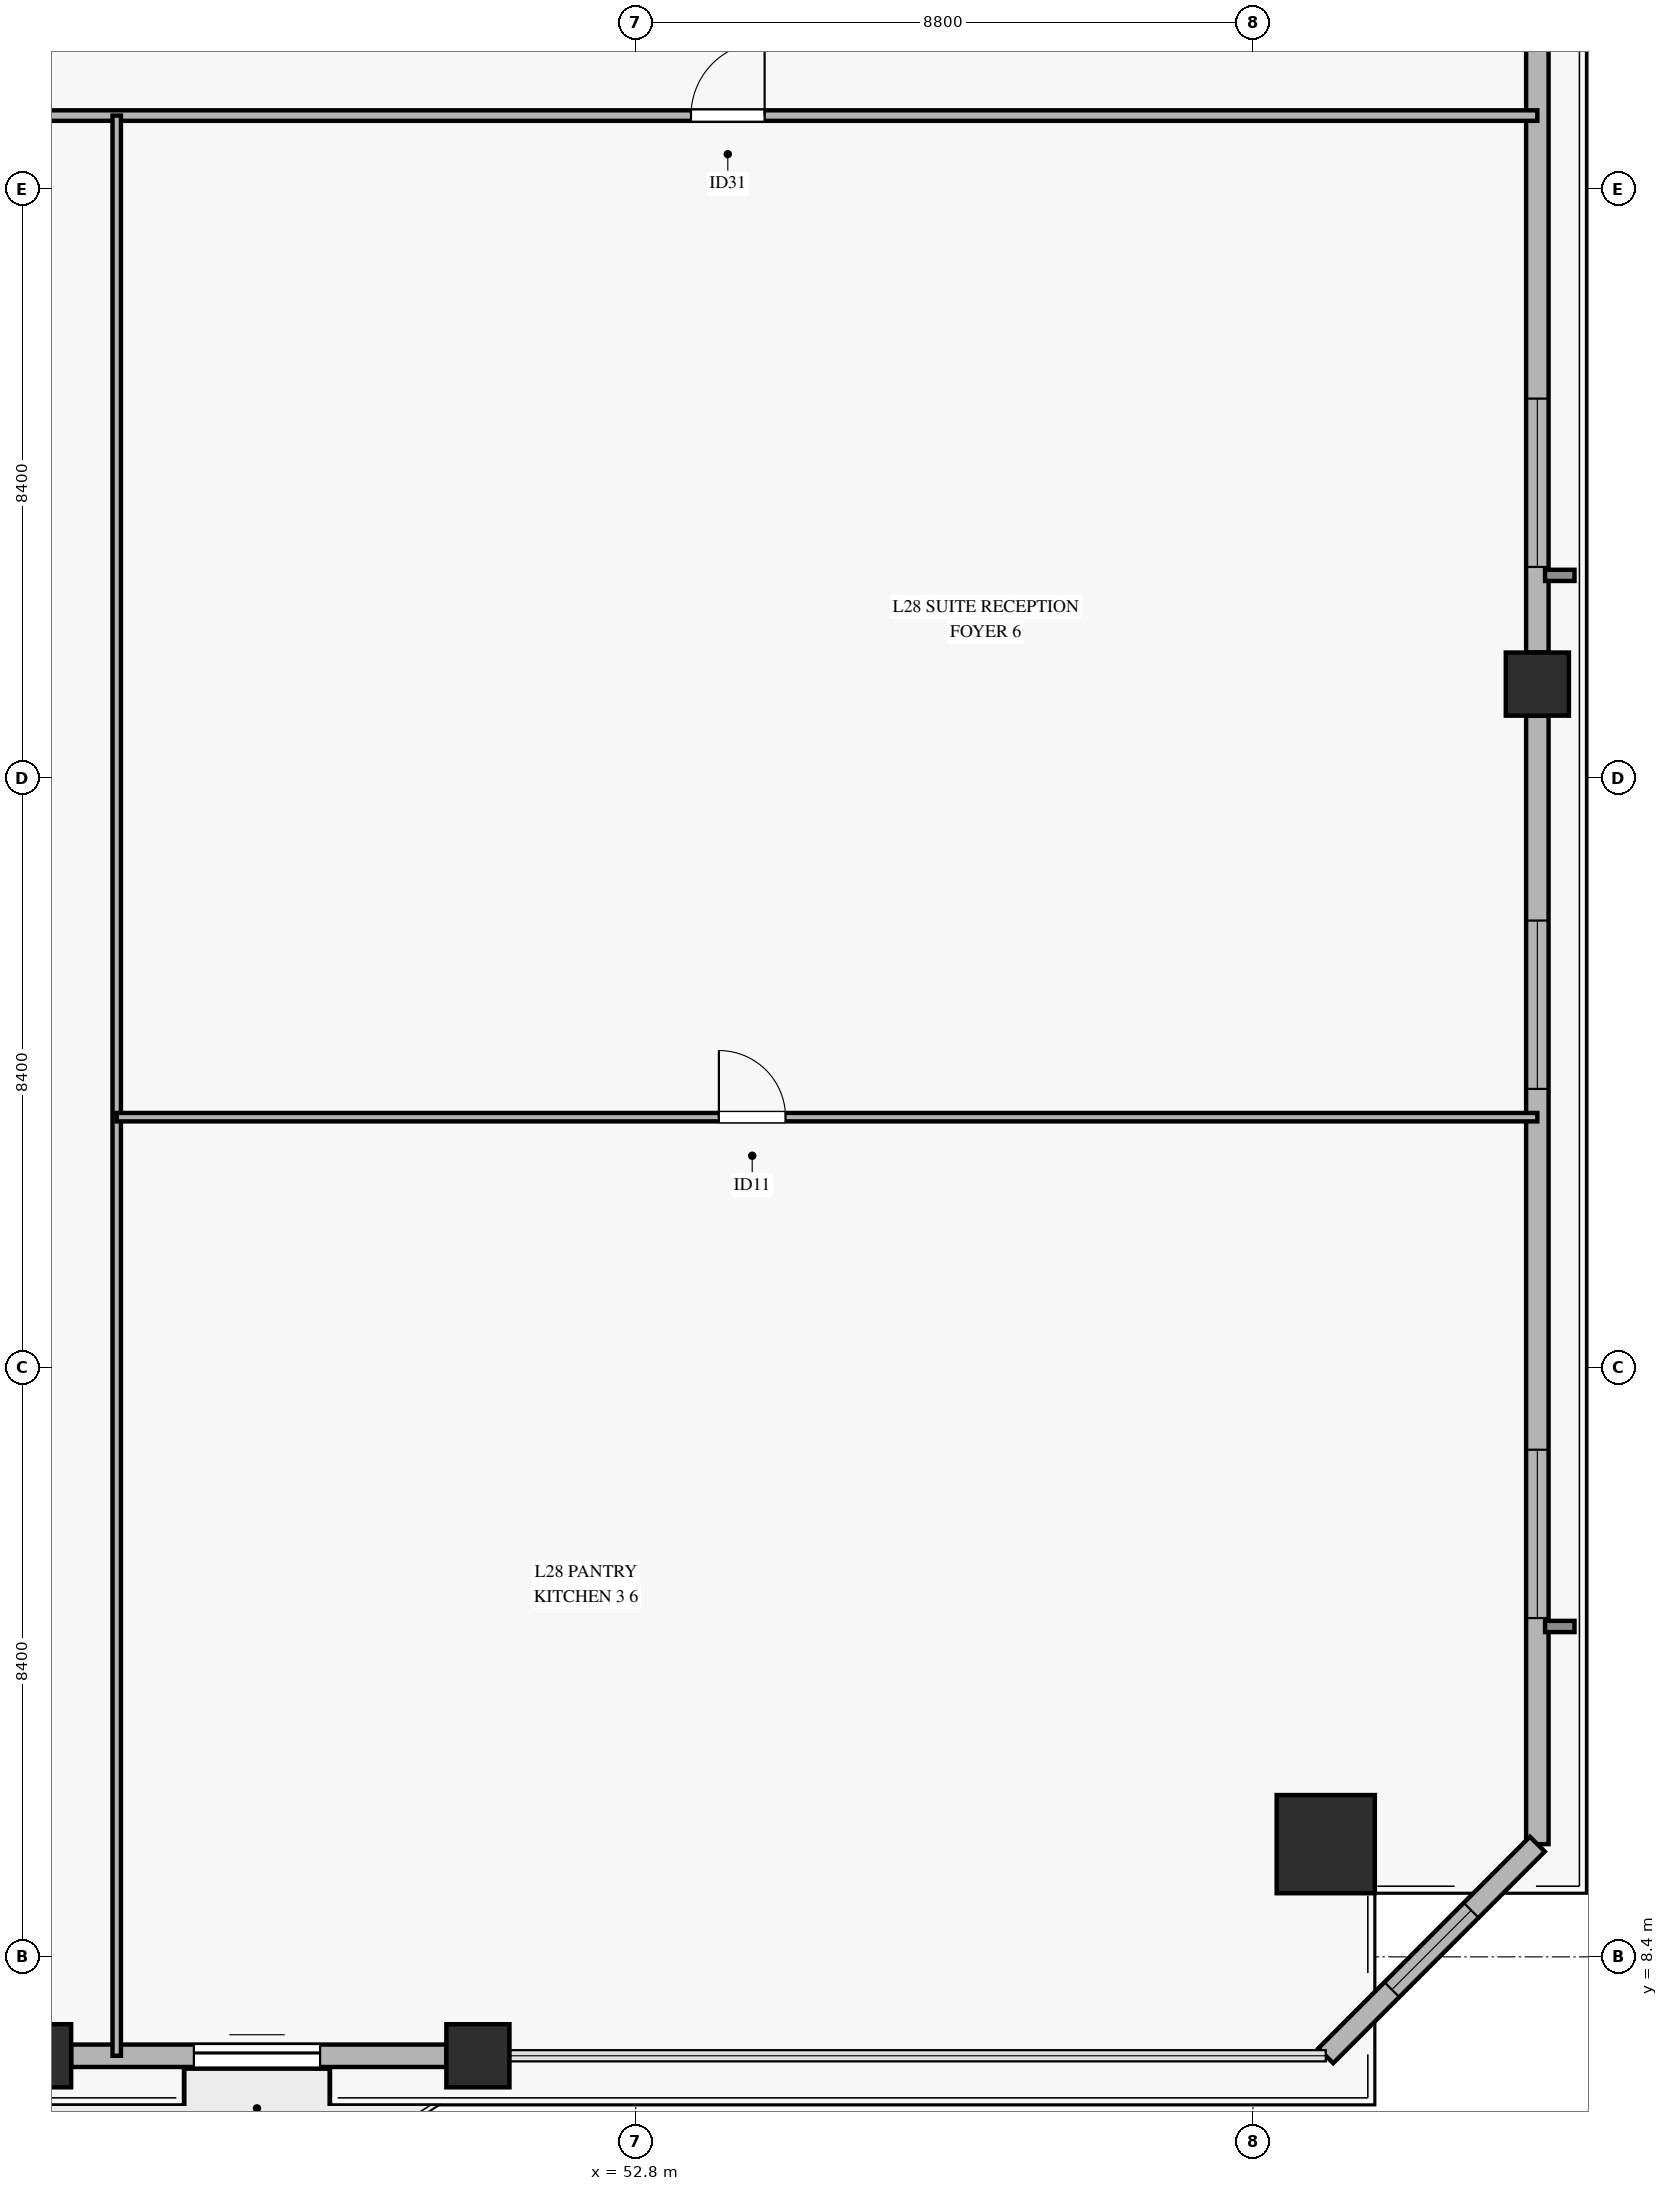
"""IFC4 building model, lengths in metres.
Left out: names, types, materials, properties, quantities, classifications, styles, units other than length and angle.
Written with IfcOpenShell. Run it as: python <this file> out.ifc"""

import sys

from ifc_helpers import new_model, si_unit, direction, frame, frame_2d, origin, origin_2d, place, context, subcontext, project, spatial, rectangle, hollow_rectangle, extrude, source, transform, mapped, element, fill, save


model = new_model("IFC4")
c1 = context("Model", 3, precision=1e-05, world=origin(), true_north=direction((0.0, 1.0)))
c2 = subcontext(c1, "Body", "Model", "MODEL_VIEW")
j1 = project(units=[si_unit("LENGTHUNIT", "METRE"), si_unit("PLANEANGLEUNIT", "RADIAN")], contexts=[c1])
p1 = place(None, origin())
s1 = spatial("IfcSite", under=j1, at=p1, CompositionType="ELEMENT")
p2 = place(p1, origin())
s2 = spatial("IfcBuilding", under=s1, at=p2, CompositionType="ELEMENT")
p3 = place(p2, frame((0.0, 0.0, 115.3)))
s3 = spatial("IfcBuildingStorey", under=s2, at=p3, CompositionType="ELEMENT", Elevation=115.3)
m1 = source(origin(), c2, "Body", "SweptSolid", [
    extrude(hollow_rectangle(XDim=1.4, YDim=1.4, WallThickness=0.065, at=origin_2d()), origin(), (0.0, 0.0, 1.0), 3.68),
])
p4 = place(p3, frame((62.639, 10.007, 0.0), z_axis=(0.0, 0.0, 1.0), x_axis=(1.0, 0.0, 0.0)))
e1 = element("IfcColumn", 1, at=p4, inside=s3, PredefinedType="COLUMN", context=c2, shape_type="MappedRepresentation", body=[
    mapped(m1, transform((0.0, 0.0, 0.0), x_axis=(1.0, 0.0, 0.0), y_axis=(0.0, 1.0, 0.0), z_axis=(0.0, 0.0, 1.0), scale=1.0)),
])
m2 = source(origin(), c2, "Body", "SweptSolid", [
    extrude(hollow_rectangle(XDim=0.9, YDim=0.9, WallThickness=0.04, at=origin_2d()), origin(), (0.0, 0.0, 1.0), 3.68),
])
for number, where, z_axis, x_axis in (
    (2, (44.3, 6.99, 0.0), (0.0, 0.0, 1.0), (1.0, 0.0, 0.0)),
    (3, (50.55, 6.99, 0.0), (0.0, 0.0, 1.0), (1.0, 0.0, 0.0)),
    (4, (65.656, 26.545, 0.0), (0.0, 0.0, 1.0), (1.0, 0.0, 0.0)),
):
    element("IfcColumn", number, at=place(p3, frame(where, z_axis=z_axis, x_axis=x_axis)), inside=s3, PredefinedType="COLUMN", context=c2, shape_type="MappedRepresentation", body=[
        mapped(m2, transform((0.0, 0.0, 0.0), x_axis=(1.0, 0.0, 0.0), y_axis=(0.0, 1.0, 0.0), z_axis=(0.0, 0.0, 1.0), scale=1.0)),
    ])
p5 = place(p3, frame((44.75, 6.99, 0.0), z_axis=(0.0, 0.0, 1.0), x_axis=(1.0, 0.0, 0.0)))
e5 = element("IfcWall", 5, at=p5, inside=s3, PredefinedType="SOLIDWALL", context=c2, shape_type="SweptSolid", body=[
    extrude(rectangle(XDim=5.35, YDim=0.32, at=frame_2d((2.675, 0.0))), origin(), (0.0, 0.0, 1.0), 3.16),
])
p6 = place(p5, frame((1.75, 0.0, 0.0)))
e6 = element("IfcOpeningElement", 6, at=p6, cuts=e5, PredefinedType="OPENING", context=c2, shape_type="SweptSolid", body=[
    extrude(rectangle(XDim=1.8, YDim=2.25, at=frame_2d((0.9, 1.125))), frame((0.0, 0.17, 0.0), z_axis=(0.0, -1.0, 0.0), x_axis=(1.0, 0.0, 0.0)), (0.0, 0.0, 1.0), 0.34),
])
p7 = place(p3, frame((65.656, 10.007, 0.0), z_axis=(0.0, 0.0, 1.0), x_axis=(0.0, 1.0, 0.0)))
e7 = element("IfcWall", 7, at=p7, inside=s3, PredefinedType="SOLIDWALL", context=c2, shape_type="SweptSolid", body=[
    extrude(rectangle(XDim=16.088, YDim=0.32, at=frame_2d((8.044, 0.0))), origin(), (0.0, 0.0, 1.0), 3.16),
])
p8 = place(p7, frame((3.223, 0.0, 0.45)))
e8 = element("IfcOpeningElement", 8, at=p8, cuts=e7, PredefinedType="OPENING", context=c2, shape_type="SweptSolid", body=[
    extrude(rectangle(XDim=2.4, YDim=2.1, at=frame_2d((1.2, 1.05))), frame((0.0, 0.17, 0.0), z_axis=(0.0, -1.0, 0.0), x_axis=(1.0, 0.0, 0.0)), (0.0, 0.0, 1.0), 0.34),
])
p9 = place(p7, frame((10.767, 0.0, 0.45)))
e9 = element("IfcOpeningElement", 9, at=p9, cuts=e7, PredefinedType="OPENING", context=c2, shape_type="SweptSolid", body=[
    extrude(rectangle(XDim=2.4, YDim=2.1, at=frame_2d((1.2, 1.05))), frame((0.0, 0.17, 0.0), z_axis=(0.0, -1.0, 0.0), x_axis=(1.0, 0.0, 0.0)), (0.0, 0.0, 1.0), 0.34),
])
p10 = place(p3, frame((65.656, 26.995, 0.0), z_axis=(0.0, 0.0, 1.0), x_axis=(0.0, 1.0, 0.0)))
e10 = element("IfcWall", 10, at=p10, inside=s3, PredefinedType="SOLIDWALL", context=c2, shape_type="SweptSolid", body=[
    extrude(rectangle(XDim=16.088, YDim=0.32, at=frame_2d((8.044, 0.0))), origin(), (0.0, 0.0, 1.0), 3.16),
])
p11 = place(p10, frame((1.22, 0.0, 0.45)))
e11 = element("IfcOpeningElement", 11, at=p11, cuts=e10, PredefinedType="OPENING", context=c2, shape_type="SweptSolid", body=[
    extrude(rectangle(XDim=2.4, YDim=2.1, at=frame_2d((1.2, 1.05))), frame((0.0, 0.17, 0.0), z_axis=(0.0, -1.0, 0.0), x_axis=(1.0, 0.0, 0.0)), (0.0, 0.0, 1.0), 0.34),
])
p12 = place(p10, frame((12.375, 0.0, 0.45)))
e12 = element("IfcOpeningElement", 12, at=p12, cuts=e10, PredefinedType="OPENING", context=c2, shape_type="SweptSolid", body=[
    extrude(rectangle(XDim=2.4, YDim=2.1, at=frame_2d((1.2, 1.05))), frame((0.0, 0.17, 0.0), z_axis=(0.0, -1.0, 0.0), x_axis=(1.0, 0.0, 0.0)), (0.0, 0.0, 1.0), 0.34),
])
p13 = place(p3, frame((62.639, 6.99, 0.0), z_axis=(0.0, 0.0, 1.0), x_axis=(0.707106781187, 0.707106781187, 0.0)))
e13 = element("IfcWall", 13, at=p13, inside=s3, PredefinedType="SOLIDWALL", context=c2, shape_type="SweptSolid", body=[
    extrude(rectangle(XDim=4.267, YDim=0.3, at=frame_2d((2.133, 0.0))), origin(), (0.0, 0.0, 1.0), 3.16),
])
p14 = place(p13, frame((1.333, 0.0, 0.45)))
e14 = element("IfcOpeningElement", 14, at=p14, cuts=e13, PredefinedType="OPENING", context=c2, shape_type="SweptSolid", body=[
    extrude(rectangle(XDim=1.6, YDim=2.0, at=frame_2d((0.8, 1.0))), frame((0.0, 0.16, 0.0), z_axis=(0.0, -1.0, 0.0), x_axis=(1.0, 0.0, 0.0)), (0.0, 0.0, 1.0), 0.32),
])
p15 = place(p3, frame((4.744, 34.65, 0.0), z_axis=(0.0, 0.0, 1.0), x_axis=(1.0, 0.0, 0.0)))
e15 = element("IfcWall", 15, at=p15, inside=s3, PredefinedType="PARTITIONING", context=c2, shape_type="SweptSolid", body=[
    extrude(rectangle(XDim=60.912, YDim=0.15, at=frame_2d((30.456, 0.0))), origin(), (0.0, 0.0, 1.0), 2.765),
])
p16 = place(p15, frame((7.61, 0.0, 0.0)))
e16 = element("IfcOpeningElement", 16, at=p16, cuts=e15, PredefinedType="OPENING", context=c2, shape_type="SweptSolid", body=[
    extrude(rectangle(XDim=1.05, YDim=2.15, at=frame_2d((0.525, 1.075))), frame((0.0, 0.085, 0.0), z_axis=(0.0, -1.0, 0.0), x_axis=(1.0, 0.0, 0.0)), (0.0, 0.0, 1.0), 0.17),
])
p17 = place(p15, frame((20.391, 0.0, 0.0)))
e17 = element("IfcOpeningElement", 17, at=p17, cuts=e15, PredefinedType="OPENING", context=c2, shape_type="SweptSolid", body=[
    extrude(rectangle(XDim=1.05, YDim=2.15, at=frame_2d((0.525, 1.075))), frame((0.0, 0.085, 0.0), z_axis=(0.0, -1.0, 0.0), x_axis=(1.0, 0.0, 0.0)), (0.0, 0.0, 1.0), 0.17),
])
p18 = place(p15, frame((26.622, 0.0, 0.0)))
e18 = element("IfcOpeningElement", 18, at=p18, cuts=e15, PredefinedType="OPENING", context=c2, shape_type="SweptSolid", body=[
    extrude(rectangle(XDim=1.05, YDim=2.15, at=frame_2d((0.525, 1.075))), frame((0.0, 0.085, 0.0), z_axis=(0.0, -1.0, 0.0), x_axis=(1.0, 0.0, 0.0)), (0.0, 0.0, 1.0), 0.17),
])
p19 = place(p15, frame((32.462, 0.0, 0.0)))
e19 = element("IfcOpeningElement", 19, at=p19, cuts=e15, PredefinedType="OPENING", context=c2, shape_type="SweptSolid", body=[
    extrude(rectangle(XDim=1.05, YDim=2.15, at=frame_2d((0.525, 1.075))), frame((0.0, 0.085, 0.0), z_axis=(0.0, -1.0, 0.0), x_axis=(1.0, 0.0, 0.0)), (0.0, 0.0, 1.0), 0.17),
])
p20 = place(p15, frame((37.919, 0.0, 0.0)))
e20 = element("IfcOpeningElement", 20, at=p20, cuts=e15, PredefinedType="OPENING", context=c2, shape_type="SweptSolid", body=[
    extrude(rectangle(XDim=1.05, YDim=2.15, at=frame_2d((0.525, 1.075))), frame((0.0, 0.085, 0.0), z_axis=(0.0, -1.0, 0.0), x_axis=(1.0, 0.0, 0.0)), (0.0, 0.0, 1.0), 0.17),
])
p21 = place(p15, frame((48.844, 0.0, 0.0)))
e21 = element("IfcOpeningElement", 21, at=p21, cuts=e15, PredefinedType="OPENING", context=c2, shape_type="SweptSolid", body=[
    extrude(rectangle(XDim=1.05, YDim=2.15, at=frame_2d((0.525, 1.075))), frame((0.0, 0.085, 0.0), z_axis=(0.0, -1.0, 0.0), x_axis=(1.0, 0.0, 0.0)), (0.0, 0.0, 1.0), 0.17),
])
p22 = place(p3, frame((45.4, 6.99, 0.0), z_axis=(0.0, 0.0, 1.0), x_axis=(0.0, 1.0, 0.0)))
e22 = element("IfcWall", 22, at=p22, inside=s3, PredefinedType="PARTITIONING", context=c2, shape_type="SweptSolid", body=[
    extrude(rectangle(XDim=27.66, YDim=0.12, at=frame_2d((13.83, 0.0))), origin(), (0.0, 0.0, 1.0), 3.165),
])
p23 = place(p3, frame((45.4, 20.371, 0.0), z_axis=(0.0, 0.0, 1.0), x_axis=(1.0, 0.0, 0.0)))
e23 = element("IfcWall", 23, at=p23, inside=s3, PredefinedType="PARTITIONING", context=c2, shape_type="SweptSolid", body=[
    extrude(rectangle(XDim=20.256, YDim=0.12, at=frame_2d((10.128, 0.0))), origin(), (0.0, 0.0, 1.0), 2.765),
])
p24 = place(p23, frame((8.586, 0.0, 0.0)))
e24 = element("IfcOpeningElement", 24, at=p24, cuts=e23, PredefinedType="OPENING", context=c2, shape_type="SweptSolid", body=[
    extrude(rectangle(XDim=0.95, YDim=2.1, at=frame_2d((0.475, 1.05))), frame((0.0, 0.07, 0.0), z_axis=(0.0, -1.0, 0.0), x_axis=(1.0, 0.0, 0.0)), (0.0, 0.0, 1.0), 0.14),
])
m3 = source(origin(), c2, "Body", "SweptSolid", [
    extrude(rectangle(XDim=1.8, YDim=2.25, at=frame_2d((0.9, 1.125))), frame((0.0, 0.025, 0.0), z_axis=(0.0, -1.0, 0.0), x_axis=(1.0, 0.0, 0.0)), (0.0, 0.0, 1.0), 0.05),
])
p25 = place(p6, origin())
e25 = element("IfcDoor", 25, at=p25, inside=s3, OperationType="SLIDING_TO_LEFT", PredefinedType="DOOR", context=c2, shape_type="MappedRepresentation", body=[
    mapped(m3, transform((0.0, 0.0, 0.0), x_axis=(1.0, 0.0, 0.0), y_axis=(0.0, 1.0, 0.0), z_axis=(0.0, 0.0, 1.0), scale=1.0)),
])
fill(e6, e25)
m4 = source(origin(), c2, "Body", "SweptSolid", [
    extrude(rectangle(XDim=2.4, YDim=2.1, at=frame_2d((1.2, 1.05))), frame((0.0, 0.03, 0.0), z_axis=(0.0, -1.0, 0.0), x_axis=(1.0, 0.0, 0.0)), (0.0, 0.0, 1.0), 0.06),
])
p26 = place(p8, origin())
e26 = element("IfcWindow", 26, at=p26, inside=s3, PartitioningType="SINGLE_PANEL", PredefinedType="WINDOW", context=c2, shape_type="MappedRepresentation", body=[
    mapped(m4, transform((0.0, 0.0, 0.0), x_axis=(1.0, 0.0, 0.0), y_axis=(0.0, 1.0, 0.0), z_axis=(0.0, 0.0, 1.0), scale=1.0)),
])
fill(e8, e26)
p27 = place(p9, origin())
e27 = element("IfcWindow", 27, at=p27, inside=s3, PartitioningType="SINGLE_PANEL", PredefinedType="WINDOW", context=c2, shape_type="MappedRepresentation", body=[
    mapped(m4, transform((0.0, 0.0, 0.0), x_axis=(1.0, 0.0, 0.0), y_axis=(0.0, 1.0, 0.0), z_axis=(0.0, 0.0, 1.0), scale=1.0)),
])
fill(e9, e27)
p28 = place(p11, origin())
e28 = element("IfcWindow", 28, at=p28, inside=s3, PartitioningType="SINGLE_PANEL", PredefinedType="WINDOW", context=c2, shape_type="MappedRepresentation", body=[
    mapped(m4, transform((0.0, 0.0, 0.0), x_axis=(1.0, 0.0, 0.0), y_axis=(0.0, 1.0, 0.0), z_axis=(0.0, 0.0, 1.0), scale=1.0)),
])
fill(e11, e28)
m5 = source(origin(), c2, "Body", "SweptSolid", [
    extrude(rectangle(XDim=1.6, YDim=2.0, at=frame_2d((0.8, 1.0))), frame((0.0, 0.03, 0.0), z_axis=(0.0, -1.0, 0.0), x_axis=(1.0, 0.0, 0.0)), (0.0, 0.0, 1.0), 0.06),
])
p29 = place(p14, origin())
e29 = element("IfcWindow", 29, at=p29, inside=s3, PartitioningType="SINGLE_PANEL", PredefinedType="WINDOW", context=c2, shape_type="MappedRepresentation", body=[
    mapped(m5, transform((0.0, 0.0, 0.0), x_axis=(1.0, 0.0, 0.0), y_axis=(0.0, 1.0, 0.0), z_axis=(0.0, 0.0, 1.0), scale=1.0)),
])
fill(e14, e29)
m6 = source(origin(), c2, "Body", "SweptSolid", [
    extrude(rectangle(XDim=1.05, YDim=2.15, at=frame_2d((0.525, 1.075))), frame((0.0, 0.025, 0.0), z_axis=(0.0, -1.0, 0.0), x_axis=(1.0, 0.0, 0.0)), (0.0, 0.0, 1.0), 0.05),
])
p30 = place(p21, origin())
e30 = element("IfcDoor", 30, at=p30, inside=s3, OperationType="SINGLE_SWING_RIGHT", PredefinedType="DOOR", context=c2, shape_type="MappedRepresentation", body=[
    mapped(m6, transform((0.0, 0.0, 0.0), x_axis=(1.0, 0.0, 0.0), y_axis=(0.0, 1.0, 0.0), z_axis=(0.0, 0.0, 1.0), scale=1.0)),
])
fill(e21, e30)
m7 = source(origin(), c2, "Body", "SweptSolid", [
    extrude(rectangle(XDim=0.95, YDim=2.1, at=frame_2d((0.475, 1.05))), frame((0.0, 0.025, 0.0), z_axis=(0.0, -1.0, 0.0), x_axis=(1.0, 0.0, 0.0)), (0.0, 0.0, 1.0), 0.05),
])
p31 = place(p24, origin())
e31 = element("IfcDoor", 31, at=p31, inside=s3, OperationType="SINGLE_SWING_LEFT", PredefinedType="DOOR", context=c2, shape_type="MappedRepresentation", body=[
    mapped(m7, transform((0.0, 0.0, 0.0), x_axis=(1.0, 0.0, 0.0), y_axis=(0.0, 1.0, 0.0), z_axis=(0.0, 0.0, 1.0), scale=1.0)),
])
fill(e24, e31)
save(model, sys.argv[1])
